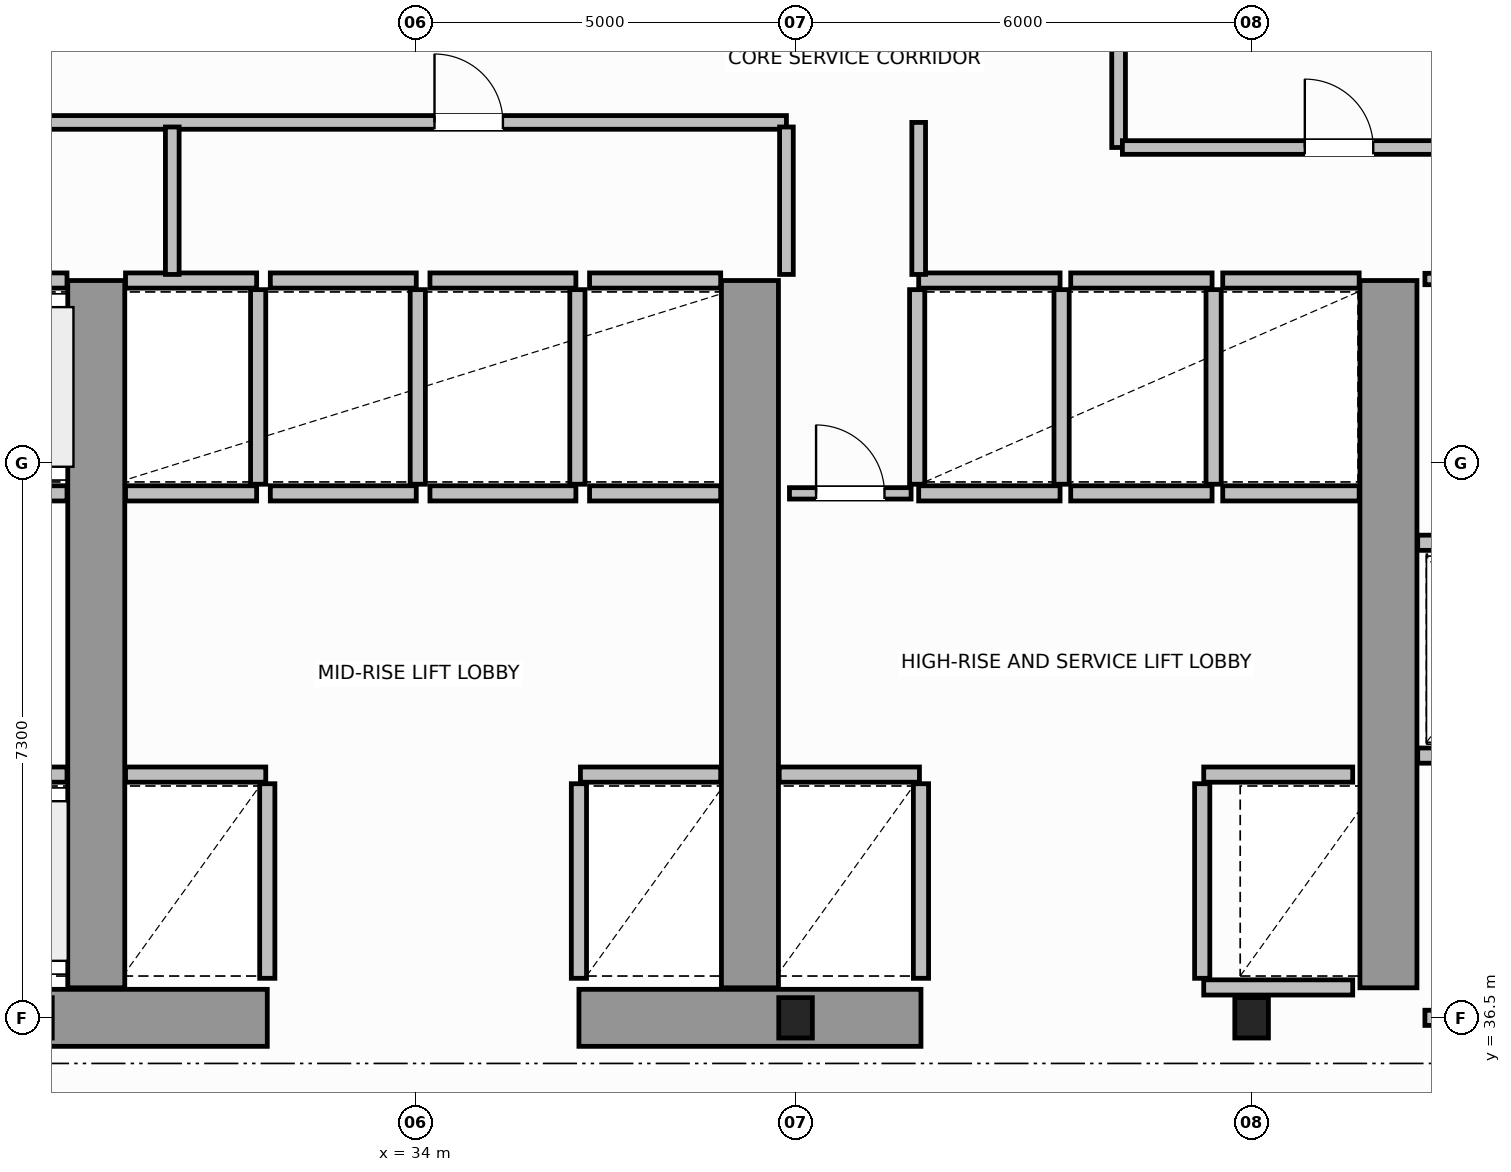
"""IFC4 building model, lengths in metres.
Left out: names, types, materials, properties, quantities, classifications, styles, units other than length and angle.
Written with IfcOpenShell. Run it as: python <this file> out.ifc"""

import sys

from ifc_helpers import new_model, si_unit, direction, frame, frame_2d, origin, origin_2d, place, context, subcontext, project, spatial, rectangle, i_section, extrude, source, transform, mapped, element, fill, save


model = new_model("IFC4")
c1 = context("Model", 3, precision=1e-05, world=origin(), true_north=direction((0.0, 1.0)))
c2 = subcontext(c1, "Body", "Model", "MODEL_VIEW")
j1 = project(units=[si_unit("LENGTHUNIT", "METRE"), si_unit("PLANEANGLEUNIT", "RADIAN")], contexts=[c1])
p1 = place(None, origin())
s1 = spatial("IfcSite", under=j1, at=p1, CompositionType="ELEMENT")
p2 = place(p1, origin())
s2 = spatial("IfcBuilding", under=s1, at=p2, CompositionType="ELEMENT")
p3 = place(p2, frame((0.0, 0.0, 92.0)))
s3 = spatial("IfcBuildingStorey", under=s2, at=p3, CompositionType="ELEMENT", Elevation=92.0)
m1 = source(origin(), c2, "Body", "SweptSolid", [
    extrude(i_section(OverallWidth=0.442, OverallDepth=0.531, WebThickness=0.065, FlangeThickness=0.076, FilletRadius=0.015, at=origin_2d()), origin(), (0.0, 0.0, 1.0), 3.8),
])
for number, where, z_axis, x_axis in (
    (1, (39.0, 36.5, 0.0), (0.0, 0.0, 1.0), (1.0, 0.0, 0.0)),
    (2, (45.0, 36.5, 0.0), (0.0, 0.0, 1.0), (1.0, 0.0, 0.0)),
):
    element("IfcColumn", number, at=place(p3, frame(where, z_axis=z_axis, x_axis=x_axis)), inside=s3, PredefinedType="COLUMN", context=c2, shape_type="MappedRepresentation", body=[
        mapped(m1, transform((0.0, 0.0, 0.0), scale=1.0)),
    ])
for number, where, z_axis, x_axis in (
    (3, (27.55, 36.5, 0.0), (0.0, 0.0, 1.0), (1.0, 0.0, 0.0)),
    (4, (36.15, 36.5, 0.0), (0.0, 0.0, 1.0), (1.0, 0.0, 0.0)),
):
    element("IfcWall", number, at=place(p3, frame(where, z_axis=z_axis, x_axis=x_axis)), inside=s3, PredefinedType="SHEAR", context=c2, shape_type="SweptSolid", body=[
        extrude(rectangle(XDim=4.5, YDim=0.75, at=frame_2d((2.25, 0.0))), origin(), (0.0, 0.0, 1.0), 3.8),
    ])
for number, where, z_axis, x_axis in (
    (5, (29.8, 36.895, 0.0), (0.0, 0.0, 1.0), (0.0, 1.0, 0.0)),
    (6, (38.4, 36.895, 0.0), (0.0, 0.0, 1.0), (0.0, 1.0, 0.0)),
    (7, (46.8, 36.895, 0.0), (0.0, 0.0, 1.0), (0.0, 1.0, 0.0)),
):
    element("IfcWall", number, at=place(p3, frame(where, z_axis=z_axis, x_axis=x_axis)), inside=s3, PredefinedType="SHEAR", context=c2, shape_type="SweptSolid", body=[
        extrude(rectangle(XDim=9.305, YDim=0.75, at=frame_2d((4.652, 0.0))), origin(), (0.0, 0.0, 1.0), 3.8),
    ])
p4 = place(p3, frame((47.28, 36.5, 0.0), z_axis=(0.0, 0.0, 1.0), x_axis=(1.0, 0.0, 0.0)))
e8 = element("IfcWall", 8, at=p4, inside=s3, PredefinedType="SOLIDWALL", context=c2, shape_type="SweptSolid", body=[
    extrude(rectangle(XDim=2.47, YDim=0.2, at=frame_2d((1.235, 0.0))), origin(), (0.0, 0.0, 1.0), 2.37),
])
p5 = place(p4, frame((0.65, 0.0, 0.0)))
e9 = element("IfcOpeningElement", 9, at=p5, cuts=e8, PredefinedType="OPENING", context=c2, shape_type="SweptSolid", body=[
    extrude(rectangle(XDim=1.1, YDim=2.15, at=frame_2d((0.55, 1.075))), frame((0.0, 0.11, 0.0), z_axis=(0.0, -1.0, 0.0), x_axis=(1.0, 0.0, 0.0)), (0.0, 0.0, 1.0), 0.22),
])
p6 = place(p3, frame((27.57, 39.7, 0.0), z_axis=(0.0, 0.0, 1.0), x_axis=(1.0, 0.0, 0.0)))
e10 = element("IfcWall", 10, at=p6, inside=s3, PredefinedType="SOLIDWALL", context=c2, shape_type="SweptSolid", body=[
    extrude(rectangle(XDim=1.845, YDim=0.2, at=frame_2d((0.922, 0.0))), origin(), (0.0, 0.0, 1.0), 3.58),
])
p7 = place(p6, frame((0.372, 0.0, 0.0)))
e11 = element("IfcOpeningElement", 11, at=p7, cuts=e10, PredefinedType="OPENING", context=c2, shape_type="SweptSolid", body=[
    extrude(rectangle(XDim=1.1, YDim=2.15, at=frame_2d((0.55, 1.075))), frame((0.0, 0.11, 0.0), z_axis=(0.0, -1.0, 0.0), x_axis=(1.0, 0.0, 0.0)), (0.0, 0.0, 1.0), 0.22),
])
p8 = place(p3, frame((27.69, 43.4, 0.0), z_axis=(0.0, 0.0, 1.0), x_axis=(1.0, 0.0, 0.0)))
e12 = element("IfcWall", 12, at=p8, inside=s3, PredefinedType="SOLIDWALL", context=c2, shape_type="SweptSolid", body=[
    extrude(rectangle(XDim=1.725, YDim=0.2, at=frame_2d((0.863, 0.0))), origin(), (0.0, 0.0, 1.0), 3.58),
])
p9 = place(p8, frame((0.312, 0.0, 0.0)))
e13 = element("IfcOpeningElement", 13, at=p9, cuts=e12, PredefinedType="OPENING", context=c2, shape_type="SweptSolid", body=[
    extrude(rectangle(XDim=1.1, YDim=2.15, at=frame_2d((0.55, 1.075))), frame((0.0, 0.11, 0.0), z_axis=(0.0, -1.0, 0.0), x_axis=(1.0, 0.0, 0.0)), (0.0, 0.0, 1.0), 0.22),
])
p10 = place(p3, frame((27.69, 46.2, 0.0), z_axis=(0.0, 0.0, 1.0), x_axis=(1.0, 0.0, 0.0)))
e14 = element("IfcWall", 14, at=p10, inside=s3, PredefinedType="SOLIDWALL", context=c2, shape_type="SweptSolid", body=[
    extrude(rectangle(XDim=1.725, YDim=0.2, at=frame_2d((0.863, 0.0))), origin(), (0.0, 0.0, 1.0), 3.58),
])
p11 = place(p3, frame((30.185, 39.7, 0.0), z_axis=(0.0, 0.0, 1.0), x_axis=(1.0, 0.0, 0.0)))
e15 = element("IfcWall", 15, at=p11, inside=s3, PredefinedType="SOLIDWALL", context=c2, shape_type="SweptSolid", body=[
    extrude(rectangle(XDim=1.845, YDim=0.2, at=frame_2d((0.922, 0.0))), origin(), (0.0, 0.0, 1.0), 3.58),
])
p12 = place(p3, frame((32.05, 37.02, 0.0), z_axis=(0.0, 0.0, 1.0), x_axis=(0.0, 1.0, 0.0)))
e16 = element("IfcWall", 16, at=p12, inside=s3, PredefinedType="SOLIDWALL", context=c2, shape_type="SweptSolid", body=[
    extrude(rectangle(XDim=2.56, YDim=0.2, at=frame_2d((1.28, 0.0))), origin(), (0.0, 0.0, 1.0), 3.58),
])
p13 = place(p3, frame((36.17, 39.7, 0.0), z_axis=(0.0, 0.0, 1.0), x_axis=(1.0, 0.0, 0.0)))
e17 = element("IfcWall", 17, at=p13, inside=s3, PredefinedType="SOLIDWALL", context=c2, shape_type="SweptSolid", body=[
    extrude(rectangle(XDim=1.845, YDim=0.2, at=frame_2d((0.922, 0.0))), origin(), (0.0, 0.0, 1.0), 3.58),
])
p14 = place(p3, frame((36.15, 37.02, 0.0), z_axis=(0.0, 0.0, 1.0), x_axis=(0.0, 1.0, 0.0)))
e18 = element("IfcWall", 18, at=p14, inside=s3, PredefinedType="SOLIDWALL", context=c2, shape_type="SweptSolid", body=[
    extrude(rectangle(XDim=2.56, YDim=0.2, at=frame_2d((1.28, 0.0))), origin(), (0.0, 0.0, 1.0), 3.58),
])
for number, where, z_axis, x_axis in (
    (19, (30.185, 43.4, 0.0), (0.0, 0.0, 1.0), (1.0, 0.0, 0.0)),
    (20, (30.185, 46.2, 0.0), (0.0, 0.0, 1.0), (1.0, 0.0, 0.0)),
):
    element("IfcWall", number, at=place(p3, frame(where, z_axis=z_axis, x_axis=x_axis)), inside=s3, PredefinedType="SOLIDWALL", context=c2, shape_type="SweptSolid", body=[
        extrude(rectangle(XDim=1.725, YDim=0.2, at=frame_2d((0.862, 0.0))), origin(), (0.0, 0.0, 1.0), 3.58),
    ])
p15 = place(p3, frame((31.93, 43.52, 0.0), z_axis=(0.0, 0.0, 1.0), x_axis=(0.0, 1.0, 0.0)))
e21 = element("IfcWall", 21, at=p15, inside=s3, PredefinedType="SOLIDWALL", context=c2, shape_type="SweptSolid", body=[
    extrude(rectangle(XDim=2.56, YDim=0.2, at=frame_2d((1.28, 0.0))), origin(), (0.0, 0.0, 1.0), 3.58),
])
for number, where, z_axis, x_axis in (
    (22, (32.09, 43.4, 0.0), (0.0, 0.0, 1.0), (1.0, 0.0, 0.0)),
    (23, (32.09, 46.2, 0.0), (0.0, 0.0, 1.0), (1.0, 0.0, 0.0)),
):
    element("IfcWall", number, at=place(p3, frame(where, z_axis=z_axis, x_axis=x_axis)), inside=s3, PredefinedType="SOLIDWALL", context=c2, shape_type="SweptSolid", body=[
        extrude(rectangle(XDim=1.92, YDim=0.2, at=frame_2d((0.96, 0.0))), origin(), (0.0, 0.0, 1.0), 3.58),
    ])
p16 = place(p3, frame((34.03, 43.52, 0.0), z_axis=(0.0, 0.0, 1.0), x_axis=(0.0, 1.0, 0.0)))
e24 = element("IfcWall", 24, at=p16, inside=s3, PredefinedType="SOLIDWALL", context=c2, shape_type="SweptSolid", body=[
    extrude(rectangle(XDim=2.56, YDim=0.2, at=frame_2d((1.28, 0.0))), origin(), (0.0, 0.0, 1.0), 3.58),
])
for number, where, z_axis, x_axis in (
    (25, (34.19, 43.4, 0.0), (0.0, 0.0, 1.0), (1.0, 0.0, 0.0)),
    (26, (34.19, 46.2, 0.0), (0.0, 0.0, 1.0), (1.0, 0.0, 0.0)),
):
    element("IfcWall", number, at=place(p3, frame(where, z_axis=z_axis, x_axis=x_axis)), inside=s3, PredefinedType="SOLIDWALL", context=c2, shape_type="SweptSolid", body=[
        extrude(rectangle(XDim=1.92, YDim=0.2, at=frame_2d((0.96, 0.0))), origin(), (0.0, 0.0, 1.0), 3.58),
    ])
p17 = place(p3, frame((36.13, 43.52, 0.0), z_axis=(0.0, 0.0, 1.0), x_axis=(0.0, 1.0, 0.0)))
e27 = element("IfcWall", 27, at=p17, inside=s3, PredefinedType="SOLIDWALL", context=c2, shape_type="SweptSolid", body=[
    extrude(rectangle(XDim=2.56, YDim=0.2, at=frame_2d((1.28, 0.0))), origin(), (0.0, 0.0, 1.0), 3.58),
])
for number, where, z_axis, x_axis in (
    (28, (36.29, 43.4, 0.0), (0.0, 0.0, 1.0), (1.0, 0.0, 0.0)),
    (29, (36.29, 46.2, 0.0), (0.0, 0.0, 1.0), (1.0, 0.0, 0.0)),
):
    element("IfcWall", number, at=place(p3, frame(where, z_axis=z_axis, x_axis=x_axis)), inside=s3, PredefinedType="SOLIDWALL", context=c2, shape_type="SweptSolid", body=[
        extrude(rectangle(XDim=1.725, YDim=0.2, at=frame_2d((0.862, 0.0))), origin(), (0.0, 0.0, 1.0), 3.58),
    ])
p18 = place(p3, frame((38.785, 39.7, 0.0), z_axis=(0.0, 0.0, 1.0), x_axis=(1.0, 0.0, 0.0)))
e30 = element("IfcWall", 30, at=p18, inside=s3, PredefinedType="SOLIDWALL", context=c2, shape_type="SweptSolid", body=[
    extrude(rectangle(XDim=1.845, YDim=0.2, at=frame_2d((0.922, 0.0))), origin(), (0.0, 0.0, 1.0), 3.58),
])
p19 = place(p3, frame((40.65, 37.02, 0.0), z_axis=(0.0, 0.0, 1.0), x_axis=(0.0, 1.0, 0.0)))
e31 = element("IfcWall", 31, at=p19, inside=s3, PredefinedType="SOLIDWALL", context=c2, shape_type="SweptSolid", body=[
    extrude(rectangle(XDim=2.56, YDim=0.2, at=frame_2d((1.28, 0.0))), origin(), (0.0, 0.0, 1.0), 3.58),
])
p20 = place(p3, frame((44.37, 39.7, 0.0), z_axis=(0.0, 0.0, 1.0), x_axis=(1.0, 0.0, 0.0)))
e32 = element("IfcWall", 32, at=p20, inside=s3, PredefinedType="SOLIDWALL", context=c2, shape_type="SweptSolid", body=[
    extrude(rectangle(XDim=1.96, YDim=0.2, at=frame_2d((0.98, 0.0))), origin(), (0.0, 0.0, 1.0), 3.58),
])
p21 = place(p3, frame((44.37, 36.9, 0.0), z_axis=(0.0, 0.0, 1.0), x_axis=(1.0, 0.0, 0.0)))
e33 = element("IfcWall", 33, at=p21, inside=s3, PredefinedType="SOLIDWALL", context=c2, shape_type="SweptSolid", body=[
    extrude(rectangle(XDim=1.96, YDim=0.2, at=frame_2d((0.98, 0.0))), origin(), (0.0, 0.0, 1.0), 2.37),
])
p22 = place(p3, frame((44.35, 37.02, 0.0), z_axis=(0.0, 0.0, 1.0), x_axis=(0.0, 1.0, 0.0)))
e34 = element("IfcWall", 34, at=p22, inside=s3, PredefinedType="SOLIDWALL", context=c2, shape_type="SweptSolid", body=[
    extrude(rectangle(XDim=2.56, YDim=0.2, at=frame_2d((1.28, 0.0))), origin(), (0.0, 0.0, 1.0), 3.58),
])
for number, where, z_axis, x_axis in (
    (35, (40.62, 43.4, 0.0), (0.0, 0.0, 1.0), (1.0, 0.0, 0.0)),
    (36, (40.62, 46.2, 0.0), (0.0, 0.0, 1.0), (1.0, 0.0, 0.0)),
):
    element("IfcWall", number, at=place(p3, frame(where, z_axis=z_axis, x_axis=x_axis)), inside=s3, PredefinedType="SOLIDWALL", context=c2, shape_type="SweptSolid", body=[
        extrude(rectangle(XDim=1.86, YDim=0.2, at=frame_2d((0.93, 0.0))), origin(), (0.0, 0.0, 1.0), 3.58),
    ])
for number, where, z_axis, x_axis in (
    (37, (40.6, 43.52, 0.0), (0.0, 0.0, 1.0), (0.0, 1.0, 0.0)),
    (38, (42.5, 43.52, 0.0), (0.0, 0.0, 1.0), (0.0, 1.0, 0.0)),
):
    element("IfcWall", number, at=place(p3, frame(where, z_axis=z_axis, x_axis=x_axis)), inside=s3, PredefinedType="SOLIDWALL", context=c2, shape_type="SweptSolid", body=[
        extrude(rectangle(XDim=2.56, YDim=0.2, at=frame_2d((1.28, 0.0))), origin(), (0.0, 0.0, 1.0), 3.58),
    ])
for number, where, z_axis, x_axis in (
    (39, (42.62, 43.4, 0.0), (0.0, 0.0, 1.0), (1.0, 0.0, 0.0)),
    (40, (42.62, 46.2, 0.0), (0.0, 0.0, 1.0), (1.0, 0.0, 0.0)),
):
    element("IfcWall", number, at=place(p3, frame(where, z_axis=z_axis, x_axis=x_axis)), inside=s3, PredefinedType="SOLIDWALL", context=c2, shape_type="SweptSolid", body=[
        extrude(rectangle(XDim=1.86, YDim=0.2, at=frame_2d((0.93, 0.0))), origin(), (0.0, 0.0, 1.0), 3.58),
    ])
p23 = place(p3, frame((44.5, 43.52, 0.0), z_axis=(0.0, 0.0, 1.0), x_axis=(0.0, 1.0, 0.0)))
e41 = element("IfcWall", 41, at=p23, inside=s3, PredefinedType="SOLIDWALL", context=c2, shape_type="SweptSolid", body=[
    extrude(rectangle(XDim=2.56, YDim=0.2, at=frame_2d((1.28, 0.0))), origin(), (0.0, 0.0, 1.0), 3.58),
])
for number, where, z_axis, x_axis in (
    (42, (44.62, 43.4, 0.0), (0.0, 0.0, 1.0), (1.0, 0.0, 0.0)),
    (43, (44.62, 46.2, 0.0), (0.0, 0.0, 1.0), (1.0, 0.0, 0.0)),
):
    element("IfcWall", number, at=place(p3, frame(where, z_axis=z_axis, x_axis=x_axis)), inside=s3, PredefinedType="SOLIDWALL", context=c2, shape_type="SweptSolid", body=[
        extrude(rectangle(XDim=1.795, YDim=0.2, at=frame_2d((0.897, 0.0))), origin(), (0.0, 0.0, 1.0), 3.58),
    ])
p24 = place(p3, frame((47.185, 39.95, 0.0), z_axis=(0.0, 0.0, 1.0), x_axis=(1.0, 0.0, 0.0)))
e44 = element("IfcWall", 44, at=p24, inside=s3, PredefinedType="SOLIDWALL", context=c2, shape_type="SweptSolid", body=[
    extrude(rectangle(XDim=2.145, YDim=0.2, at=frame_2d((1.073, 0.0))), origin(), (0.0, 0.0, 1.0), 3.58),
])
p25 = place(p24, frame((0.522, 0.0, 0.0)))
e45 = element("IfcOpeningElement", 45, at=p25, cuts=e44, PredefinedType="OPENING", context=c2, shape_type="SweptSolid", body=[
    extrude(rectangle(XDim=1.1, YDim=2.15, at=frame_2d((0.55, 1.075))), frame((0.0, 0.11, 0.0), z_axis=(0.0, -1.0, 0.0), x_axis=(1.0, 0.0, 0.0)), (0.0, 0.0, 1.0), 0.22),
])
p26 = place(p3, frame((47.185, 42.75, 0.0), z_axis=(0.0, 0.0, 1.0), x_axis=(1.0, 0.0, 0.0)))
e46 = element("IfcWall", 46, at=p26, inside=s3, PredefinedType="SOLIDWALL", context=c2, shape_type="SweptSolid", body=[
    extrude(rectangle(XDim=2.145, YDim=0.2, at=frame_2d((1.073, 0.0))), origin(), (0.0, 0.0, 1.0), 3.58),
])
p27 = place(p3, frame((47.28, 46.22, 0.0), z_axis=(0.0, 0.0, 1.0), x_axis=(1.0, 0.0, 0.0)))
e47 = element("IfcWall", 47, at=p27, inside=s3, PredefinedType="PARTITIONING", context=c2, shape_type="SweptSolid", body=[
    extrude(rectangle(XDim=2.1, YDim=0.15, at=frame_2d((1.05, 0.0))), origin(), (0.0, 0.0, 1.0), 3.58),
])
p28 = place(p27, frame((0.55, 0.0, 0.0)))
e48 = element("IfcOpeningElement", 48, at=p28, cuts=e47, PredefinedType="OPENING", context=c2, shape_type="SweptSolid", body=[
    extrude(rectangle(XDim=0.9, YDim=2.1, at=frame_2d((0.45, 1.05))), frame((0.0, 0.085, 0.0), z_axis=(0.0, -1.0, 0.0), x_axis=(1.0, 0.0, 0.0)), (0.0, 0.0, 1.0), 0.17),
])
p29 = place(p3, frame((38.92, 43.4, 0.0), z_axis=(0.0, 0.0, 1.0), x_axis=(1.0, 0.0, 0.0)))
e49 = element("IfcWall", 49, at=p29, inside=s3, PredefinedType="PARTITIONING", context=c2, shape_type="SweptSolid", body=[
    extrude(rectangle(XDim=1.6, YDim=0.15, at=frame_2d((0.8, 0.0))), origin(), (0.0, 0.0, 1.0), 3.58),
])
p30 = place(p29, frame((0.35, 0.0, 0.0)))
e50 = element("IfcOpeningElement", 50, at=p30, cuts=e49, PredefinedType="OPENING", context=c2, shape_type="SweptSolid", body=[
    extrude(rectangle(XDim=0.9, YDim=2.1, at=frame_2d((0.45, 1.05))), frame((0.0, 0.085, 0.0), z_axis=(0.0, -1.0, 0.0), x_axis=(1.0, 0.0, 0.0)), (0.0, 0.0, 1.0), 0.17),
])
p31 = place(p3, frame((23.85, 48.28, 0.0), z_axis=(0.0, 0.0, 1.0), x_axis=(1.0, 0.0, 0.0)))
e51 = element("IfcWall", 51, at=p31, inside=s3, PredefinedType="PLUMBINGWALL", context=c2, shape_type="SweptSolid", body=[
    extrude(rectangle(XDim=15.03, YDim=0.18, at=frame_2d((7.515, 0.0))), origin(), (0.0, 0.0, 1.0), 3.58),
])
p32 = place(p31, frame((2.9, 0.0, 0.0)))
e52 = element("IfcOpeningElement", 52, at=p32, cuts=e51, PredefinedType="OPENING", context=c2, shape_type="SweptSolid", body=[
    extrude(rectangle(XDim=0.9, YDim=2.15, at=frame_2d((0.45, 1.075))), frame((0.0, 0.1, 0.0), z_axis=(0.0, -1.0, 0.0), x_axis=(1.0, 0.0, 0.0)), (0.0, 0.0, 1.0), 0.2),
])
p33 = place(p31, frame((10.4, 0.0, 0.0)))
e53 = element("IfcOpeningElement", 53, at=p33, cuts=e51, PredefinedType="OPENING", context=c2, shape_type="SweptSolid", body=[
    extrude(rectangle(XDim=0.9, YDim=2.15, at=frame_2d((0.45, 1.075))), frame((0.0, 0.1, 0.0), z_axis=(0.0, -1.0, 0.0), x_axis=(1.0, 0.0, 0.0)), (0.0, 0.0, 1.0), 0.2),
])
for number, where, z_axis, x_axis in (
    (54, (30.8, 46.28, 0.0), (0.0, 0.0, 1.0), (0.0, 1.0, 0.0)),
    (55, (38.88, 46.28, 0.0), (0.0, 0.0, 1.0), (0.0, 1.0, 0.0)),
):
    element("IfcWall", number, at=place(p3, frame(where, z_axis=z_axis, x_axis=x_axis)), inside=s3, PredefinedType="PLUMBINGWALL", context=c2, shape_type="SweptSolid", body=[
        extrude(rectangle(XDim=1.94, YDim=0.18, at=frame_2d((0.97, 0.0))), origin(), (0.0, 0.0, 1.0), 3.58),
    ])
p34 = place(p3, frame((40.62, 46.28, 0.0), z_axis=(0.0, 0.0, 1.0), x_axis=(0.0, 1.0, 0.0)))
e56 = element("IfcWall", 56, at=p34, inside=s3, PredefinedType="PLUMBINGWALL", context=c2, shape_type="SweptSolid", body=[
    extrude(rectangle(XDim=2.0, YDim=0.18, at=frame_2d((1.0, 0.0))), origin(), (0.0, 0.0, 1.0), 3.58),
])
p35 = place(p3, frame((43.25, 47.95, 0.0), z_axis=(0.0, 0.0, 1.0), x_axis=(0.0, 1.0, 0.0)))
e57 = element("IfcWall", 57, at=p35, inside=s3, PredefinedType="PLUMBINGWALL", context=c2, shape_type="SweptSolid", body=[
    extrude(rectangle(XDim=2.28, YDim=0.18, at=frame_2d((1.14, 0.0))), origin(), (0.0, 0.0, 1.0), 3.58),
])
p36 = place(p3, frame((43.3, 47.95, 0.0), z_axis=(0.0, 0.0, 1.0), x_axis=(1.0, 0.0, 0.0)))
e58 = element("IfcWall", 58, at=p36, inside=s3, PredefinedType="PLUMBINGWALL", context=c2, shape_type="SweptSolid", body=[
    extrude(rectangle(XDim=6.08, YDim=0.18, at=frame_2d((3.04, 0.0))), origin(), (0.0, 0.0, 1.0), 3.58),
])
p37 = place(p36, frame((2.4, 0.0, 0.0)))
e59 = element("IfcOpeningElement", 59, at=p37, cuts=e58, PredefinedType="OPENING", context=c2, shape_type="SweptSolid", body=[
    extrude(rectangle(XDim=0.9, YDim=2.15, at=frame_2d((0.45, 1.075))), frame((0.0, 0.1, 0.0), z_axis=(0.0, -1.0, 0.0), x_axis=(1.0, 0.0, 0.0)), (0.0, 0.0, 1.0), 0.2),
])
m2 = source(origin(), c2, "Body", "SweptSolid", [
    extrude(rectangle(XDim=0.9, YDim=2.1, at=frame_2d((0.45, 1.05))), frame((0.0, 0.025, 0.0), z_axis=(0.0, -1.0, 0.0), x_axis=(1.0, 0.0, 0.0)), (0.0, 0.0, 1.0), 0.05),
])
p38 = place(p30, origin())
e60 = element("IfcDoor", 60, at=p38, inside=s3, OperationType="SINGLE_SWING_LEFT", PredefinedType="DOOR", context=c2, shape_type="MappedRepresentation", body=[
    mapped(m2, transform((0.0, 0.0, 0.0), scale=1.0)),
])
fill(e50, e60)
m3 = source(origin(), c2, "Body", "SweptSolid", [
    extrude(rectangle(XDim=0.9, YDim=2.15, at=frame_2d((0.45, 1.075))), frame((0.0, 0.025, 0.0), z_axis=(0.0, -1.0, 0.0), x_axis=(1.0, 0.0, 0.0)), (0.0, 0.0, 1.0), 0.05),
])
p39 = place(p33, origin())
e61 = element("IfcDoor", 61, at=p39, inside=s3, OperationType="SINGLE_SWING_LEFT", PredefinedType="DOOR", context=c2, shape_type="MappedRepresentation", body=[
    mapped(m3, transform((0.0, 0.0, 0.0), scale=1.0)),
])
fill(e53, e61)
p40 = place(p37, origin())
e62 = element("IfcDoor", 62, at=p40, inside=s3, OperationType="SINGLE_SWING_RIGHT", PredefinedType="DOOR", context=c2, shape_type="MappedRepresentation", body=[
    mapped(m3, transform((0.0, 0.0, 0.0), scale=1.0)),
])
fill(e59, e62)
save(model, sys.argv[1])
